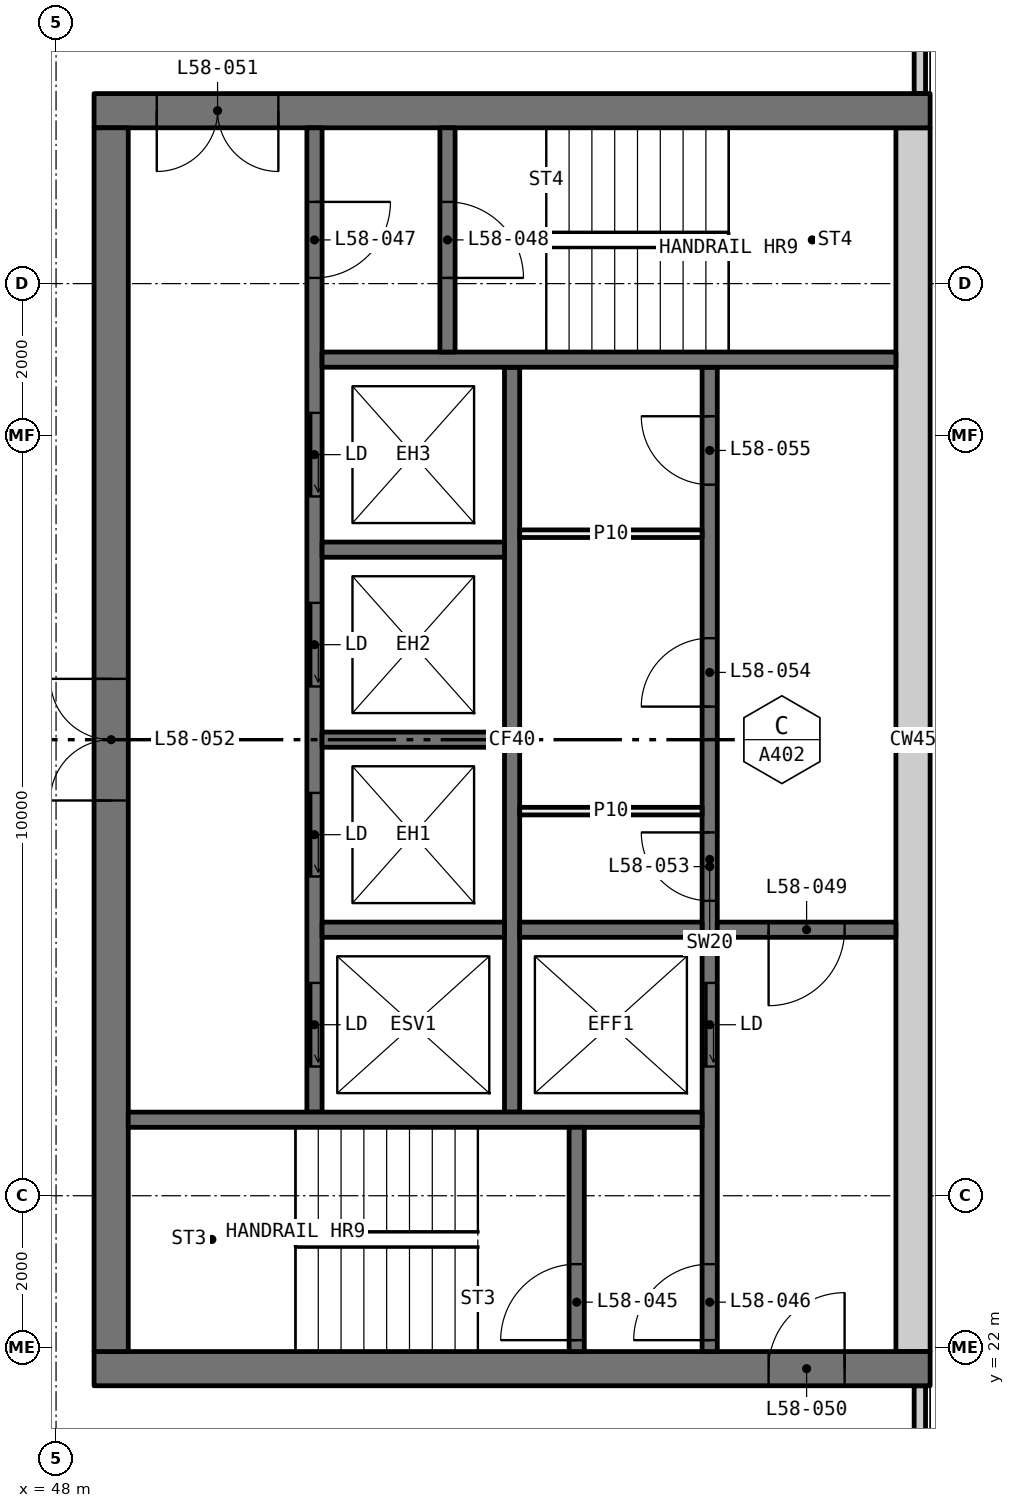
"""IFC4 building model, lengths in metres.
Left out: names, types, materials, properties, quantities, classifications, styles, units other than length and angle.
Written with IfcOpenShell. Run it as: python <this file> out.ifc"""

import sys

from ifc_helpers import new_model, si_unit, direction, frame, frame_2d, origin, place, context, subcontext, project, spatial, rectangle, extrude, element, fill, save


model = new_model("IFC4")
c1 = context("Model", 3, precision=1e-05, world=origin(), true_north=direction((0.0, 1.0)))
c2 = subcontext(c1, "Body", "Model", "MODEL_VIEW")
j1 = project(units=[si_unit("LENGTHUNIT", "METRE"), si_unit("PLANEANGLEUNIT", "RADIAN")], contexts=[c1])
p1 = place(None, origin())
s1 = spatial("IfcSite", under=j1, at=p1, CompositionType="ELEMENT")
p2 = place(p1, origin())
s2 = spatial("IfcBuilding", under=s1, at=p2, CompositionType="ELEMENT")
p3 = place(p2, frame((0.0, 0.0, 217.95)))
s3 = spatial("IfcBuildingStorey", under=s2, at=p3, CompositionType="ELEMENT", Elevation=217.95)
for number, where, z_axis, x_axis in (
    (1, (59.365, 18.71, 0.0), (0.0, 0.0, 1.0), (0.0, 1.0, 0.0)),
    (2, (59.365, 38.5, 0.0), (0.0, 0.0, 1.0), (0.0, 1.0, 0.0)),
):
    element("IfcWall", number, at=place(p3, frame(where, z_axis=z_axis, x_axis=x_axis)), inside=s3, PredefinedType="ELEMENTEDWALL", context=c2, shape_type="SweptSolid", body=[
        extrude(rectangle(XDim=2.79, YDim=0.15, at=frame_2d((1.395, 0.0))), origin(), (0.0, 0.0, 1.0), 3.05),
    ])
p4 = place(p3, frame((59.5, 21.725, 0.0), z_axis=(0.0, 0.0, 1.0), x_axis=(-1.0, 0.0, 0.0)))
e3 = element("IfcWall", 3, at=p4, inside=s3, PredefinedType="SHEAR", context=c2, shape_type="SweptSolid", body=[
    extrude(rectangle(XDim=11.0, YDim=0.45, at=frame_2d((5.5, 0.0))), origin(), (0.0, 0.0, 1.0), 3.05),
])
p5 = place(p4, frame((1.125, 0.0, 0.0)))
e4 = element("IfcOpeningElement", 4, at=p5, cuts=e3, PredefinedType="OPENING", context=c2, shape_type="SweptSolid", body=[
    extrude(rectangle(XDim=1.0, YDim=2.1, at=frame_2d((0.5, 1.05))), frame((0.0, 0.235, 0.0), z_axis=(0.0, -1.0, 0.0), x_axis=(1.0, 0.0, 0.0)), (0.0, 0.0, 1.0), 0.47),
])
p6 = place(p3, frame((59.5, 38.275, 0.0), z_axis=(0.0, 0.0, 1.0), x_axis=(-1.0, 0.0, 0.0)))
e5 = element("IfcWall", 5, at=p6, inside=s3, PredefinedType="SHEAR", context=c2, shape_type="SweptSolid", body=[
    extrude(rectangle(XDim=11.0, YDim=0.45, at=frame_2d((5.5, 0.0))), origin(), (0.0, 0.0, 1.0), 3.05),
])
p7 = place(p6, frame((8.575, 0.0, 0.0)))
e6 = element("IfcOpeningElement", 6, at=p7, cuts=e5, PredefinedType="OPENING", context=c2, shape_type="SweptSolid", body=[
    extrude(rectangle(XDim=1.6, YDim=2.1, at=frame_2d((0.8, 1.05))), frame((0.0, 0.235, 0.0), z_axis=(0.0, -1.0, 0.0), x_axis=(1.0, 0.0, 0.0)), (0.0, 0.0, 1.0), 0.47),
])
p8 = place(p3, frame((59.275, 21.95, 0.0), z_axis=(0.0, 0.0, 1.0), x_axis=(0.0, 1.0, 0.0)))
e7 = element("IfcWall", 7, at=p8, inside=s3, PredefinedType="SHEAR", context=c2, shape_type="SweptSolid", body=[
    extrude(rectangle(XDim=16.1, YDim=0.45, at=frame_2d((8.05, 0.0))), origin(), (0.0, 0.0, 1.0), 3.05),
])
p9 = place(p3, frame((48.725, 21.95, 0.0), z_axis=(0.0, 0.0, 1.0), x_axis=(0.0, 1.0, 0.0)))
e8 = element("IfcWall", 8, at=p9, inside=s3, PredefinedType="SHEAR", context=c2, shape_type="SweptSolid", body=[
    extrude(rectangle(XDim=16.1, YDim=0.45, at=frame_2d((8.05, 0.0))), origin(), (0.0, 0.0, 1.0), 3.05),
])
p10 = place(p9, frame((7.25, 0.0, 0.0)))
e9 = element("IfcOpeningElement", 9, at=p10, cuts=e8, PredefinedType="OPENING", context=c2, shape_type="SweptSolid", body=[
    extrude(rectangle(XDim=1.6, YDim=2.1, at=frame_2d((0.8, 1.05))), frame((0.0, 0.235, 0.0), z_axis=(0.0, -1.0, 0.0), x_axis=(1.0, 0.0, 0.0)), (0.0, 0.0, 1.0), 0.47),
])
p11 = place(p3, frame((56.6, 21.95, 0.0), z_axis=(0.0, 0.0, 1.0), x_axis=(0.0, 1.0, 0.0)))
e10 = element("IfcWall", 10, at=p11, inside=s3, PredefinedType="SOLIDWALL", context=c2, shape_type="SweptSolid", body=[
    extrude(rectangle(XDim=12.95, YDim=0.2, at=frame_2d((6.475, 0.0))), origin(), (0.0, 0.0, 1.0), 3.05),
])
p12 = place(p11, frame((3.75, 0.0, 0.0)))
e11 = element("IfcOpeningElement", 11, at=p12, cuts=e10, PredefinedType="OPENING", context=c2, shape_type="SweptSolid", body=[
    extrude(rectangle(XDim=1.1, YDim=2.1, at=frame_2d((0.55, 1.05))), frame((0.0, 0.11, 0.0), z_axis=(0.0, -1.0, 0.0), x_axis=(1.0, 0.0, 0.0)), (0.0, 0.0, 1.0), 0.22),
])
p13 = place(p11, frame((0.15, 0.0, 0.0)))
e12 = element("IfcOpeningElement", 12, at=p13, cuts=e10, PredefinedType="OPENING", context=c2, shape_type="SweptSolid", body=[
    extrude(rectangle(XDim=1.0, YDim=2.1, at=frame_2d((0.5, 1.05))), frame((0.0, 0.11, 0.0), z_axis=(0.0, -1.0, 0.0), x_axis=(1.0, 0.0, 0.0)), (0.0, 0.0, 1.0), 0.22),
])
p14 = place(p11, frame((5.93, 0.0, 0.0)))
e13 = element("IfcOpeningElement", 13, at=p14, cuts=e10, PredefinedType="OPENING", context=c2, shape_type="SweptSolid", body=[
    extrude(rectangle(XDim=0.9, YDim=2.1, at=frame_2d((0.45, 1.05))), frame((0.0, 0.11, 0.0), z_axis=(0.0, -1.0, 0.0), x_axis=(1.0, 0.0, 0.0)), (0.0, 0.0, 1.0), 0.22),
])
p15 = place(p11, frame((8.485, 0.0, 0.0)))
e14 = element("IfcOpeningElement", 14, at=p15, cuts=e10, PredefinedType="OPENING", context=c2, shape_type="SweptSolid", body=[
    extrude(rectangle(XDim=0.9, YDim=2.1, at=frame_2d((0.45, 1.05))), frame((0.0, 0.11, 0.0), z_axis=(0.0, -1.0, 0.0), x_axis=(1.0, 0.0, 0.0)), (0.0, 0.0, 1.0), 0.22),
])
p16 = place(p11, frame((11.405, 0.0, 0.0)))
e15 = element("IfcOpeningElement", 15, at=p16, cuts=e10, PredefinedType="OPENING", context=c2, shape_type="SweptSolid", body=[
    extrude(rectangle(XDim=0.9, YDim=2.1, at=frame_2d((0.45, 1.05))), frame((0.0, 0.11, 0.0), z_axis=(0.0, -1.0, 0.0), x_axis=(1.0, 0.0, 0.0)), (0.0, 0.0, 1.0), 0.22),
])
p17 = place(p3, frame((51.4, 25.1, 0.0), z_axis=(0.0, 0.0, 1.0), x_axis=(0.0, 1.0, 0.0)))
e16 = element("IfcWall", 16, at=p17, inside=s3, PredefinedType="SOLIDWALL", context=c2, shape_type="SweptSolid", body=[
    extrude(rectangle(XDim=12.95, YDim=0.2, at=frame_2d((6.475, 0.0))), origin(), (0.0, 0.0, 1.0), 3.05),
])
p18 = place(p17, frame((0.6, 0.0, 0.0)))
e17 = element("IfcOpeningElement", 17, at=p18, cuts=e16, PredefinedType="OPENING", context=c2, shape_type="SweptSolid", body=[
    extrude(rectangle(XDim=1.1, YDim=2.1, at=frame_2d((0.55, 1.05))), frame((0.0, 0.11, 0.0), z_axis=(0.0, -1.0, 0.0), x_axis=(1.0, 0.0, 0.0)), (0.0, 0.0, 1.0), 0.22),
])
p19 = place(p17, frame((3.1, 0.0, 0.0)))
e18 = element("IfcOpeningElement", 18, at=p19, cuts=e16, PredefinedType="OPENING", context=c2, shape_type="SweptSolid", body=[
    extrude(rectangle(XDim=1.1, YDim=2.1, at=frame_2d((0.55, 1.05))), frame((0.0, 0.11, 0.0), z_axis=(0.0, -1.0, 0.0), x_axis=(1.0, 0.0, 0.0)), (0.0, 0.0, 1.0), 0.22),
])
p20 = place(p17, frame((5.6, 0.0, 0.0)))
e19 = element("IfcOpeningElement", 19, at=p20, cuts=e16, PredefinedType="OPENING", context=c2, shape_type="SweptSolid", body=[
    extrude(rectangle(XDim=1.1, YDim=2.1, at=frame_2d((0.55, 1.05))), frame((0.0, 0.11, 0.0), z_axis=(0.0, -1.0, 0.0), x_axis=(1.0, 0.0, 0.0)), (0.0, 0.0, 1.0), 0.22),
])
p21 = place(p17, frame((8.1, 0.0, 0.0)))
e20 = element("IfcOpeningElement", 20, at=p21, cuts=e16, PredefinedType="OPENING", context=c2, shape_type="SweptSolid", body=[
    extrude(rectangle(XDim=1.1, YDim=2.1, at=frame_2d((0.55, 1.05))), frame((0.0, 0.11, 0.0), z_axis=(0.0, -1.0, 0.0), x_axis=(1.0, 0.0, 0.0)), (0.0, 0.0, 1.0), 0.22),
])
p22 = place(p17, frame((10.975, 0.0, 0.0)))
e21 = element("IfcOpeningElement", 21, at=p22, cuts=e16, PredefinedType="OPENING", context=c2, shape_type="SweptSolid", body=[
    extrude(rectangle(XDim=1.0, YDim=2.1, at=frame_2d((0.5, 1.05))), frame((0.0, 0.11, 0.0), z_axis=(0.0, -1.0, 0.0), x_axis=(1.0, 0.0, 0.0)), (0.0, 0.0, 1.0), 0.22),
])
p23 = place(p3, frame((54.0, 25.1, 0.0), z_axis=(0.0, 0.0, 1.0), x_axis=(0.0, 1.0, 0.0)))
e22 = element("IfcWall", 22, at=p23, inside=s3, PredefinedType="SOLIDWALL", context=c2, shape_type="SweptSolid", body=[
    extrude(rectangle(XDim=9.8, YDim=0.2, at=frame_2d((4.9, 0.0))), origin(), (0.0, 0.0, 1.0), 3.05),
])
for number, where, z_axis, x_axis in (
    (23, (56.5, 25.0, 0.0), (0.0, 0.0, 1.0), (-1.0, 0.0, 0.0)),
    (24, (59.05, 35.0, 0.0), (0.0, 0.0, 1.0), (-1.0, 0.0, 0.0)),
):
    element("IfcWall", number, at=place(p3, frame(where, z_axis=z_axis, x_axis=x_axis)), inside=s3, PredefinedType="SOLIDWALL", context=c2, shape_type="SweptSolid", body=[
        extrude(rectangle(XDim=7.55, YDim=0.2, at=frame_2d((3.775, 0.0))), origin(), (0.0, 0.0, 1.0), 3.05),
    ])
p24 = place(p3, frame((59.05, 27.5, 0.0), z_axis=(0.0, 0.0, 1.0), x_axis=(-1.0, 0.0, 0.0)))
e25 = element("IfcWall", 25, at=p24, inside=s3, PredefinedType="SOLIDWALL", context=c2, shape_type="SweptSolid", body=[
    extrude(rectangle(XDim=2.35, YDim=0.2, at=frame_2d((1.175, 0.0))), origin(), (0.0, 0.0, 1.0), 3.05),
])
p25 = place(p24, frame((0.675, 0.0, 0.0)))
e26 = element("IfcOpeningElement", 26, at=p25, cuts=e25, PredefinedType="OPENING", context=c2, shape_type="SweptSolid", body=[
    extrude(rectangle(XDim=1.0, YDim=2.1, at=frame_2d((0.5, 1.05))), frame((0.0, 0.11, 0.0), z_axis=(0.0, -1.0, 0.0), x_axis=(1.0, 0.0, 0.0)), (0.0, 0.0, 1.0), 0.22),
])
p26 = place(p3, frame((54.85, 21.95, 0.0), z_axis=(0.0, 0.0, 1.0), x_axis=(0.0, 1.0, 0.0)))
e27 = element("IfcWall", 27, at=p26, inside=s3, PredefinedType="SOLIDWALL", context=c2, shape_type="SweptSolid", body=[
    extrude(rectangle(XDim=2.95, YDim=0.2, at=frame_2d((1.475, 0.0))), origin(), (0.0, 0.0, 1.0), 3.05),
])
p27 = place(p26, frame((0.15, 0.0, 0.0)))
e28 = element("IfcOpeningElement", 28, at=p27, cuts=e27, PredefinedType="OPENING", context=c2, shape_type="SweptSolid", body=[
    extrude(rectangle(XDim=1.0, YDim=2.1, at=frame_2d((0.5, 1.05))), frame((0.0, 0.11, 0.0), z_axis=(0.0, -1.0, 0.0), x_axis=(1.0, 0.0, 0.0)), (0.0, 0.0, 1.0), 0.22),
])
p28 = place(p3, frame((53.15, 35.1, 0.0), z_axis=(0.0, 0.0, 1.0), x_axis=(0.0, 1.0, 0.0)))
e29 = element("IfcWall", 29, at=p28, inside=s3, PredefinedType="SOLIDWALL", context=c2, shape_type="SweptSolid", body=[
    extrude(rectangle(XDim=2.95, YDim=0.2, at=frame_2d((1.475, 0.0))), origin(), (0.0, 0.0, 1.0), 3.05),
])
p29 = place(p28, frame((0.975, 0.0, 0.0)))
e30 = element("IfcOpeningElement", 30, at=p29, cuts=e29, PredefinedType="OPENING", context=c2, shape_type="SweptSolid", body=[
    extrude(rectangle(XDim=1.0, YDim=2.1, at=frame_2d((0.5, 1.05))), frame((0.0, 0.11, 0.0), z_axis=(0.0, -1.0, 0.0), x_axis=(1.0, 0.0, 0.0)), (0.0, 0.0, 1.0), 0.22),
])
for number, where, z_axis, x_axis in (
    (31, (56.5, 27.5, 0.0), (0.0, 0.0, 1.0), (-1.0, 0.0, 0.0)),
    (32, (53.9, 27.5, 0.0), (0.0, 0.0, 1.0), (-1.0, 0.0, 0.0)),
    (33, (53.9, 30.0, 0.0), (0.0, 0.0, 1.0), (-1.0, 0.0, 0.0)),
    (34, (53.9, 32.5, 0.0), (0.0, 0.0, 1.0), (-1.0, 0.0, 0.0)),
):
    element("IfcWall", number, at=place(p3, frame(where, z_axis=z_axis, x_axis=x_axis)), inside=s3, PredefinedType="SOLIDWALL", context=c2, shape_type="SweptSolid", body=[
        extrude(rectangle(XDim=2.4, YDim=0.2, at=frame_2d((1.2, 0.0))), origin(), (0.0, 0.0, 1.0), 3.05),
    ])
for number, where, z_axis, x_axis in (
    (35, (56.5, 29.06, 0.0), (0.0, 0.0, 1.0), (-1.0, 0.0, 0.0)),
    (36, (56.5, 32.71, 0.0), (0.0, 0.0, 1.0), (-1.0, 0.0, 0.0)),
):
    element("IfcWall", number, at=place(p3, frame(where, z_axis=z_axis, x_axis=x_axis)), inside=s3, PredefinedType="PARTITIONING", context=c2, shape_type="SweptSolid", body=[
        extrude(rectangle(XDim=2.4, YDim=0.1, at=frame_2d((1.2, 0.0))), origin(), (0.0, 0.0, 1.0), 3.05),
    ])
p30 = place(p18, origin())
e37 = element("IfcDoor", 37, at=p30, inside=s3, OperationType="SLIDING_TO_LEFT", PredefinedType="DOOR", context=c2, shape_type="SweptSolid", body=[
    extrude(rectangle(XDim=1.1, YDim=2.1, at=frame_2d((0.55, 1.05))), frame((0.0, 0.025, 0.0), z_axis=(0.0, -1.0, 0.0), x_axis=(1.0, 0.0, 0.0)), (0.0, 0.0, 1.0), 0.05),
])
fill(e17, e37)
p31 = place(p19, origin())
e38 = element("IfcDoor", 38, at=p31, inside=s3, OperationType="SLIDING_TO_LEFT", PredefinedType="DOOR", context=c2, shape_type="SweptSolid", body=[
    extrude(rectangle(XDim=1.1, YDim=2.1, at=frame_2d((0.55, 1.05))), frame((0.0, 0.025, 0.0), z_axis=(0.0, -1.0, 0.0), x_axis=(1.0, 0.0, 0.0)), (0.0, 0.0, 1.0), 0.05),
])
fill(e18, e38)
p32 = place(p20, origin())
e39 = element("IfcDoor", 39, at=p32, inside=s3, OperationType="SLIDING_TO_LEFT", PredefinedType="DOOR", context=c2, shape_type="SweptSolid", body=[
    extrude(rectangle(XDim=1.1, YDim=2.1, at=frame_2d((0.55, 1.05))), frame((0.0, 0.025, 0.0), z_axis=(0.0, -1.0, 0.0), x_axis=(1.0, 0.0, 0.0)), (0.0, 0.0, 1.0), 0.05),
])
fill(e19, e39)
p33 = place(p21, origin())
e40 = element("IfcDoor", 40, at=p33, inside=s3, OperationType="SLIDING_TO_LEFT", PredefinedType="DOOR", context=c2, shape_type="SweptSolid", body=[
    extrude(rectangle(XDim=1.1, YDim=2.1, at=frame_2d((0.55, 1.05))), frame((0.0, 0.025, 0.0), z_axis=(0.0, -1.0, 0.0), x_axis=(1.0, 0.0, 0.0)), (0.0, 0.0, 1.0), 0.05),
])
fill(e20, e40)
p34 = place(p12, origin())
e41 = element("IfcDoor", 41, at=p34, inside=s3, OperationType="SLIDING_TO_LEFT", PredefinedType="DOOR", context=c2, shape_type="SweptSolid", body=[
    extrude(rectangle(XDim=1.1, YDim=2.1, at=frame_2d((0.55, 1.05))), frame((0.0, 0.025, 0.0), z_axis=(0.0, -1.0, 0.0), x_axis=(1.0, 0.0, 0.0)), (0.0, 0.0, 1.0), 0.05),
])
fill(e11, e41)
p35 = place(p27, origin())
e42 = element("IfcDoor", 42, at=p35, inside=s3, OperationType="SINGLE_SWING_RIGHT", PredefinedType="DOOR", context=c2, shape_type="SweptSolid", body=[
    extrude(rectangle(XDim=1.0, YDim=2.1, at=frame_2d((0.5, 1.05))), frame((0.0, 0.025, 0.0), z_axis=(0.0, -1.0, 0.0), x_axis=(1.0, 0.0, 0.0)), (0.0, 0.0, 1.0), 0.05),
])
fill(e28, e42)
p36 = place(p13, origin())
e43 = element("IfcDoor", 43, at=p36, inside=s3, OperationType="SINGLE_SWING_RIGHT", PredefinedType="DOOR", context=c2, shape_type="SweptSolid", body=[
    extrude(rectangle(XDim=1.0, YDim=2.1, at=frame_2d((0.5, 1.05))), frame((0.0, 0.025, 0.0), z_axis=(0.0, -1.0, 0.0), x_axis=(1.0, 0.0, 0.0)), (0.0, 0.0, 1.0), 0.05),
])
fill(e12, e43)
p37 = place(p22, frame((1.0, 0.0, 0.0), x_axis=(-1.0, 0.0, 0.0)))
e44 = element("IfcDoor", 44, at=p37, inside=s3, OperationType="SINGLE_SWING_RIGHT", PredefinedType="DOOR", context=c2, shape_type="SweptSolid", body=[
    extrude(rectangle(XDim=1.0, YDim=2.1, at=frame_2d((0.5, 1.05))), frame((0.0, 0.025, 0.0), z_axis=(0.0, -1.0, 0.0), x_axis=(1.0, 0.0, 0.0)), (0.0, 0.0, 1.0), 0.05),
])
fill(e21, e44)
p38 = place(p29, frame((1.0, 0.0, 0.0), x_axis=(-1.0, 0.0, 0.0)))
e45 = element("IfcDoor", 45, at=p38, inside=s3, OperationType="SINGLE_SWING_LEFT", PredefinedType="DOOR", context=c2, shape_type="SweptSolid", body=[
    extrude(rectangle(XDim=1.0, YDim=2.1, at=frame_2d((0.5, 1.05))), frame((0.0, 0.025, 0.0), z_axis=(0.0, -1.0, 0.0), x_axis=(1.0, 0.0, 0.0)), (0.0, 0.0, 1.0), 0.05),
])
fill(e30, e45)
p39 = place(p25, origin())
e46 = element("IfcDoor", 46, at=p39, inside=s3, OperationType="SINGLE_SWING_LEFT", PredefinedType="DOOR", context=c2, shape_type="SweptSolid", body=[
    extrude(rectangle(XDim=1.0, YDim=2.1, at=frame_2d((0.5, 1.05))), frame((0.0, 0.025, 0.0), z_axis=(0.0, -1.0, 0.0), x_axis=(1.0, 0.0, 0.0)), (0.0, 0.0, 1.0), 0.05),
])
fill(e26, e46)
p40 = place(p5, frame((1.0, 0.0, 0.0), x_axis=(-1.0, 0.0, 0.0)))
e47 = element("IfcDoor", 47, at=p40, inside=s3, OperationType="SINGLE_SWING_LEFT", PredefinedType="DOOR", context=c2, shape_type="SweptSolid", body=[
    extrude(rectangle(XDim=1.0, YDim=2.1, at=frame_2d((0.5, 1.05))), frame((0.0, 0.025, 0.0), z_axis=(0.0, -1.0, 0.0), x_axis=(1.0, 0.0, 0.0)), (0.0, 0.0, 1.0), 0.05),
])
fill(e4, e47)
p41 = place(p7, origin())
e48 = element("IfcDoor", 48, at=p41, inside=s3, OperationType="DOUBLE_DOOR_SINGLE_SWING", PredefinedType="DOOR", context=c2, shape_type="SweptSolid", body=[
    extrude(rectangle(XDim=1.6, YDim=2.1, at=frame_2d((0.8, 1.05))), frame((0.0, 0.025, 0.0), z_axis=(0.0, -1.0, 0.0), x_axis=(1.0, 0.0, 0.0)), (0.0, 0.0, 1.0), 0.05),
])
fill(e6, e48)
p42 = place(p10, origin())
e49 = element("IfcDoor", 49, at=p42, inside=s3, OperationType="DOUBLE_DOOR_SINGLE_SWING", PredefinedType="DOOR", context=c2, shape_type="SweptSolid", body=[
    extrude(rectangle(XDim=1.6, YDim=2.1, at=frame_2d((0.8, 1.05))), frame((0.0, 0.025, 0.0), z_axis=(0.0, -1.0, 0.0), x_axis=(1.0, 0.0, 0.0)), (0.0, 0.0, 1.0), 0.05),
])
fill(e9, e49)
p43 = place(p14, origin())
e50 = element("IfcDoor", 50, at=p43, inside=s3, OperationType="SINGLE_SWING_LEFT", PredefinedType="DOOR", context=c2, shape_type="SweptSolid", body=[
    extrude(rectangle(XDim=0.9, YDim=2.1, at=frame_2d((0.45, 1.05))), frame((0.0, 0.025, 0.0), z_axis=(0.0, -1.0, 0.0), x_axis=(1.0, 0.0, 0.0)), (0.0, 0.0, 1.0), 0.05),
])
fill(e13, e50)
p44 = place(p15, origin())
e51 = element("IfcDoor", 51, at=p44, inside=s3, OperationType="SINGLE_SWING_RIGHT", PredefinedType="DOOR", context=c2, shape_type="SweptSolid", body=[
    extrude(rectangle(XDim=0.9, YDim=2.1, at=frame_2d((0.45, 1.05))), frame((0.0, 0.025, 0.0), z_axis=(0.0, -1.0, 0.0), x_axis=(1.0, 0.0, 0.0)), (0.0, 0.0, 1.0), 0.05),
])
fill(e14, e51)
p45 = place(p16, origin())
e52 = element("IfcDoor", 52, at=p45, inside=s3, OperationType="SINGLE_SWING_LEFT", PredefinedType="DOOR", context=c2, shape_type="SweptSolid", body=[
    extrude(rectangle(XDim=0.9, YDim=2.1, at=frame_2d((0.45, 1.05))), frame((0.0, 0.025, 0.0), z_axis=(0.0, -1.0, 0.0), x_axis=(1.0, 0.0, 0.0)), (0.0, 0.0, 1.0), 0.05),
])
fill(e15, e52)
save(model, sys.argv[1])
